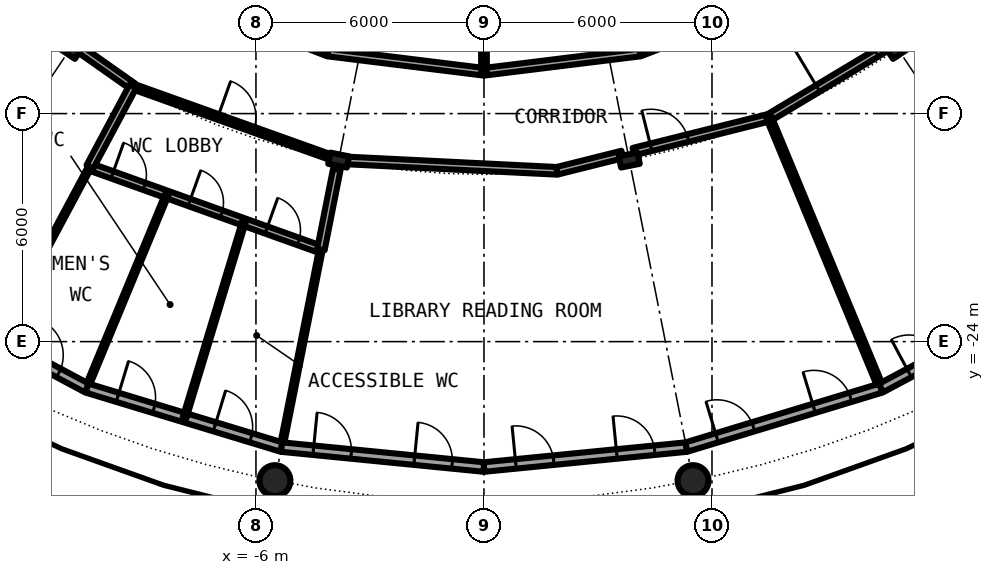
"""IFC4 building model, lengths in metres.
Left out: names, types, materials, properties, quantities, classifications, styles, units other than length and angle.
Written with IfcOpenShell. Run it as: python <this file> out.ifc"""

import sys

from ifc_helpers import new_model, si_unit, direction, frame, frame_2d, origin, origin_2d, place, context, subcontext, project, spatial, rectangle, hollow_circle, i_section, extrude, element, fill, save


model = new_model("IFC4")
c1 = context("Model", 3, precision=1e-05, world=origin(), true_north=direction((0.0, 1.0)))
c2 = subcontext(c1, "Body", "Model", "MODEL_VIEW")
j1 = project(units=[si_unit("LENGTHUNIT", "METRE"), si_unit("PLANEANGLEUNIT", "RADIAN")], contexts=[c1])
p1 = place(None, origin())
s1 = spatial("IfcSite", under=j1, at=p1, CompositionType="ELEMENT")
p2 = place(p1, origin())
s2 = spatial("IfcBuilding", under=s1, at=p2, CompositionType="ELEMENT")
p3 = place(p2, frame((0.0, 0.0, 157.4)))
s3 = spatial("IfcBuildingStorey", under=s2, at=p3, CompositionType="ELEMENT", Elevation=157.4)
for number, where, z_axis, x_axis in (
    (1, (-5.501, -27.658, 0.0), (0.0, 0.0, 1.0), (1.0, 0.0, 0.0)),
    (2, (5.501, -27.658, 0.0), (0.0, 0.0, 1.0), (1.0, 0.0, 0.0)),
):
    element("IfcColumn", number, at=place(p3, frame(where, z_axis=z_axis, x_axis=x_axis)), inside=s3, PredefinedType="COLUMN", context=c2, shape_type="SweptSolid", body=[
        extrude(hollow_circle(Radius=0.406, WallThickness=0.04, at=origin_2d()), origin(), (0.0, 0.0, 1.0), 4.2),
    ])
for number, where, z_axis, x_axis in (
    (3, (-10.889, -16.297, 0.0), (0.0, 0.0, 1.0), (-0.556, -0.831, 0.0)),
    (4, (-3.824, -19.223, 0.0), (0.0, 0.0, 1.0), (-0.195, -0.981, 0.0)),
    (5, (3.824, -19.223, 0.0), (0.0, 0.0, 1.0), (0.195, -0.981, 0.0)),
    (6, (10.889, -16.297, 0.0), (0.0, 0.0, 1.0), (0.556, -0.831, 0.0)),
):
    element("IfcColumn", number, at=place(p3, frame(where, z_axis=z_axis, x_axis=x_axis)), inside=s3, PredefinedType="COLUMN", context=c2, shape_type="SweptSolid", body=[
        extrude(i_section(OverallWidth=0.3, OverallDepth=0.5, WebThickness=0.014, FlangeThickness=0.028, FilletRadius=0.027, at=origin_2d()), origin(), (0.0, 0.0, 1.0), 4.2),
    ])
p4 = place(p3, frame((-15.167, -22.699, 0.0), z_axis=(0.0, 0.0, 1.0), x_axis=(0.881915646801, -0.471407246368, 0.0)))
e7 = element("IfcWall", 7, at=p4, inside=s3, PredefinedType="SOLIDWALL", context=c2, shape_type="SweptSolid", body=[
    extrude(rectangle(XDim=5.352, YDim=0.25, at=frame_2d((2.676, 0.0))), origin(), (0.0, 0.0, 1.0), 3.85),
])
p5 = place(p4, frame((0.841, 0.0, 0.0)))
e8 = element("IfcOpeningElement", 8, at=p5, cuts=e7, PredefinedType="OPENING", context=c2, shape_type="SweptSolid", body=[
    extrude(rectangle(XDim=1.0, YDim=2.2, at=frame_2d((0.5, 1.1))), frame((0.0, 0.135, 0.0), z_axis=(0.0, -1.0, 0.0), x_axis=(1.0, 0.0, 0.0)), (0.0, 0.0, 1.0), 0.27),
])
p6 = place(p4, frame((3.51, 0.0, 0.0)))
e9 = element("IfcOpeningElement", 9, at=p6, cuts=e7, PredefinedType="OPENING", context=c2, shape_type="SweptSolid", body=[
    extrude(rectangle(XDim=1.0, YDim=2.2, at=frame_2d((0.5, 1.1))), frame((0.0, 0.135, 0.0), z_axis=(0.0, -1.0, 0.0), x_axis=(1.0, 0.0, 0.0)), (0.0, 0.0, 1.0), 0.27),
])
p7 = place(p3, frame((-10.447, -25.222, 0.0), z_axis=(0.0, 0.0, 1.0), x_axis=(0.956965678721, -0.290201119486, 0.0)))
e10 = element("IfcWall", 10, at=p7, inside=s3, PredefinedType="SOLIDWALL", context=c2, shape_type="SweptSolid", body=[
    extrude(rectangle(XDim=5.351, YDim=0.25, at=frame_2d((2.676, 0.0))), origin(), (0.0, 0.0, 1.0), 3.85),
])
p8 = place(p7, frame((0.841, 0.0, 0.0)))
e11 = element("IfcOpeningElement", 11, at=p8, cuts=e10, PredefinedType="OPENING", context=c2, shape_type="SweptSolid", body=[
    extrude(rectangle(XDim=1.0, YDim=2.2, at=frame_2d((0.5, 1.1))), frame((0.0, 0.135, 0.0), z_axis=(0.0, -1.0, 0.0), x_axis=(1.0, 0.0, 0.0)), (0.0, 0.0, 1.0), 0.27),
])
p9 = place(p7, frame((3.51, 0.0, 0.0)))
e12 = element("IfcOpeningElement", 12, at=p9, cuts=e10, PredefinedType="OPENING", context=c2, shape_type="SweptSolid", body=[
    extrude(rectangle(XDim=1.0, YDim=2.2, at=frame_2d((0.5, 1.1))), frame((0.0, 0.135, 0.0), z_axis=(0.0, -1.0, 0.0), x_axis=(1.0, 0.0, 0.0)), (0.0, 0.0, 1.0), 0.27),
])
p10 = place(p3, frame((-5.326, -26.775, 0.0), z_axis=(0.0, 0.0, 1.0), x_axis=(0.995173996315, -0.098126026407, 0.0)))
e13 = element("IfcWall", 13, at=p10, inside=s3, PredefinedType="SOLIDWALL", context=c2, shape_type="SweptSolid", body=[
    extrude(rectangle(XDim=5.352, YDim=0.25, at=frame_2d((2.676, 0.0))), origin(), (0.0, 0.0, 1.0), 3.85),
])
p11 = place(p10, frame((0.841, 0.0, 0.0)))
e14 = element("IfcOpeningElement", 14, at=p11, cuts=e13, PredefinedType="OPENING", context=c2, shape_type="SweptSolid", body=[
    extrude(rectangle(XDim=1.0, YDim=2.2, at=frame_2d((0.5, 1.1))), frame((0.0, 0.135, 0.0), z_axis=(0.0, -1.0, 0.0), x_axis=(1.0, 0.0, 0.0)), (0.0, 0.0, 1.0), 0.27),
])
p12 = place(p10, frame((3.51, 0.0, 0.0)))
e15 = element("IfcOpeningElement", 15, at=p12, cuts=e13, PredefinedType="OPENING", context=c2, shape_type="SweptSolid", body=[
    extrude(rectangle(XDim=1.0, YDim=2.2, at=frame_2d((0.5, 1.1))), frame((0.0, 0.135, 0.0), z_axis=(0.0, -1.0, 0.0), x_axis=(1.0, 0.0, 0.0)), (0.0, 0.0, 1.0), 0.27),
])
p13 = place(p3, frame((0.0, -27.3, 0.0), z_axis=(0.0, 0.0, 1.0), x_axis=(0.995173996315, 0.098126026407, 0.0)))
e16 = element("IfcWall", 16, at=p13, inside=s3, PredefinedType="SOLIDWALL", context=c2, shape_type="SweptSolid", body=[
    extrude(rectangle(XDim=5.352, YDim=0.25, at=frame_2d((2.676, 0.0))), origin(), (0.0, 0.0, 1.0), 3.85),
])
p14 = place(p13, frame((0.841, 0.0, 0.0)))
e17 = element("IfcOpeningElement", 17, at=p14, cuts=e16, PredefinedType="OPENING", context=c2, shape_type="SweptSolid", body=[
    extrude(rectangle(XDim=1.0, YDim=2.2, at=frame_2d((0.5, 1.1))), frame((0.0, 0.135, 0.0), z_axis=(0.0, -1.0, 0.0), x_axis=(1.0, 0.0, 0.0)), (0.0, 0.0, 1.0), 0.27),
])
p15 = place(p13, frame((3.51, 0.0, 0.0)))
e18 = element("IfcOpeningElement", 18, at=p15, cuts=e16, PredefinedType="OPENING", context=c2, shape_type="SweptSolid", body=[
    extrude(rectangle(XDim=1.0, YDim=2.2, at=frame_2d((0.5, 1.1))), frame((0.0, 0.135, 0.0), z_axis=(0.0, -1.0, 0.0), x_axis=(1.0, 0.0, 0.0)), (0.0, 0.0, 1.0), 0.27),
])
p16 = place(p3, frame((5.326, -26.775, 0.0), z_axis=(0.0, 0.0, 1.0), x_axis=(0.956965678721, 0.290201119486, 0.0)))
e19 = element("IfcWall", 19, at=p16, inside=s3, PredefinedType="SOLIDWALL", context=c2, shape_type="SweptSolid", body=[
    extrude(rectangle(XDim=5.351, YDim=0.25, at=frame_2d((2.676, 0.0))), origin(), (0.0, 0.0, 1.0), 3.85),
])
p17 = place(p16, frame((0.841, 0.0, 0.0)))
e20 = element("IfcOpeningElement", 20, at=p17, cuts=e19, PredefinedType="OPENING", context=c2, shape_type="SweptSolid", body=[
    extrude(rectangle(XDim=1.0, YDim=2.2, at=frame_2d((0.5, 1.1))), frame((0.0, 0.135, 0.0), z_axis=(0.0, -1.0, 0.0), x_axis=(1.0, 0.0, 0.0)), (0.0, 0.0, 1.0), 0.27),
])
p18 = place(p16, frame((3.51, 0.0, 0.0)))
e21 = element("IfcOpeningElement", 21, at=p18, cuts=e19, PredefinedType="OPENING", context=c2, shape_type="SweptSolid", body=[
    extrude(rectangle(XDim=1.0, YDim=2.2, at=frame_2d((0.5, 1.1))), frame((0.0, 0.135, 0.0), z_axis=(0.0, -1.0, 0.0), x_axis=(1.0, 0.0, 0.0)), (0.0, 0.0, 1.0), 0.27),
])
p19 = place(p3, frame((10.447, -25.222, 0.0), z_axis=(0.0, 0.0, 1.0), x_axis=(0.881915646801, 0.471407246368, 0.0)))
e22 = element("IfcWall", 22, at=p19, inside=s3, PredefinedType="SOLIDWALL", context=c2, shape_type="SweptSolid", body=[
    extrude(rectangle(XDim=5.352, YDim=0.25, at=frame_2d((2.676, 0.0))), origin(), (0.0, 0.0, 1.0), 3.85),
])
p20 = place(p19, frame((0.841, 0.0, 0.0)))
e23 = element("IfcOpeningElement", 23, at=p20, cuts=e22, PredefinedType="OPENING", context=c2, shape_type="SweptSolid", body=[
    extrude(rectangle(XDim=1.0, YDim=2.2, at=frame_2d((0.5, 1.1))), frame((0.0, 0.135, 0.0), z_axis=(0.0, -1.0, 0.0), x_axis=(1.0, 0.0, 0.0)), (0.0, 0.0, 1.0), 0.27),
])
p21 = place(p19, frame((3.51, 0.0, 0.0)))
e24 = element("IfcOpeningElement", 24, at=p21, cuts=e22, PredefinedType="OPENING", context=c2, shape_type="SweptSolid", body=[
    extrude(rectangle(XDim=1.0, YDim=2.2, at=frame_2d((0.5, 1.1))), frame((0.0, 0.135, 0.0), z_axis=(0.0, -1.0, 0.0), x_axis=(1.0, 0.0, 0.0)), (0.0, 0.0, 1.0), 0.27),
])
p22 = place(p3, frame((-10.373, -19.401, 0.0), z_axis=(0.0, 0.0, 1.0), x_axis=(0.941534771306, -0.336915826909, 0.0)))
e25 = element("IfcWall", 25, at=p22, inside=s3, PredefinedType="PARTITIONING", context=c2, shape_type="SweptSolid", body=[
    extrude(rectangle(XDim=6.459, YDim=0.2, at=frame_2d((3.229, 0.0))), origin(), (0.0, 0.0, 1.0), 3.85),
])
p23 = place(p22, frame((0.627, 0.0, 0.0)))
e26 = element("IfcOpeningElement", 26, at=p23, cuts=e25, PredefinedType="OPENING", context=c2, shape_type="SweptSolid", body=[
    extrude(rectangle(XDim=0.9, YDim=2.3, at=frame_2d((0.45, 1.15))), frame((0.0, 0.11, 0.0), z_axis=(0.0, -1.0, 0.0), x_axis=(1.0, 0.0, 0.0)), (0.0, 0.0, 1.0), 0.22),
])
p24 = place(p22, frame((2.781, 0.0, 0.0)))
e27 = element("IfcOpeningElement", 27, at=p24, cuts=e25, PredefinedType="OPENING", context=c2, shape_type="SweptSolid", body=[
    extrude(rectangle(XDim=0.9, YDim=2.3, at=frame_2d((0.45, 1.15))), frame((0.0, 0.11, 0.0), z_axis=(0.0, -1.0, 0.0), x_axis=(1.0, 0.0, 0.0)), (0.0, 0.0, 1.0), 0.22),
])
p25 = place(p22, frame((4.933, 0.0, 0.0)))
e28 = element("IfcOpeningElement", 28, at=p25, cuts=e25, PredefinedType="OPENING", context=c2, shape_type="SweptSolid", body=[
    extrude(rectangle(XDim=0.9, YDim=2.3, at=frame_2d((0.45, 1.15))), frame((0.0, 0.11, 0.0), z_axis=(0.0, -1.0, 0.0), x_axis=(1.0, 0.0, 0.0)), (0.0, 0.0, 1.0), 0.22),
])
p26 = place(p3, frame((-10.688, -16.266, 0.0), z_axis=(0.0, 0.0, 1.0), x_axis=(0.817772792535, -0.575541188613, 0.0)))
e29 = element("IfcWall", 29, at=p26, inside=s3, PredefinedType="PARTITIONING", context=c2, shape_type="SweptSolid", body=[
    extrude(rectangle(XDim=1.772, YDim=0.2, at=frame_2d((0.886, 0.0))), origin(), (0.0, 0.0, 1.0), 3.54),
])
p27 = place(p3, frame((-9.239, -17.286, 0.0), z_axis=(0.0, 0.0, 1.0), x_axis=(0.941550382061, -0.336872198379, 0.0)))
e30 = element("IfcWall", 30, at=p27, inside=s3, PredefinedType="PARTITIONING", context=c2, shape_type="SweptSolid", body=[
    extrude(rectangle(XDim=5.599, YDim=0.15, at=frame_2d((2.8, 0.0))), origin(), (0.0, 0.0, 1.0), 3.54),
])
p28 = place(p27, frame((2.376, 0.0, 0.0)))
e31 = element("IfcOpeningElement", 31, at=p28, cuts=e30, PredefinedType="OPENING", context=c2, shape_type="SweptSolid", body=[
    extrude(rectangle(XDim=1.0, YDim=2.3, at=frame_2d((0.5, 1.15))), frame((0.0, 0.085, 0.0), z_axis=(0.0, -1.0, 0.0), x_axis=(1.0, 0.0, 0.0)), (0.0, 0.0, 1.0), 0.17),
])
p29 = place(p3, frame((-3.672, -19.23, 0.0), z_axis=(0.0, 0.0, 1.0), x_axis=(0.998783562084, -0.049309188909, 0.0)))
e32 = element("IfcWall", 32, at=p29, inside=s3, PredefinedType="PARTITIONING", context=c2, shape_type="SweptSolid", body=[
    extrude(rectangle(XDim=5.6, YDim=0.2, at=frame_2d((2.8, 0.0))), origin(), (0.0, 0.0, 1.0), 3.54),
])
p30 = place(p3, frame((1.921, -19.506, 0.0), z_axis=(0.0, 0.0, 1.0), x_axis=(0.969996560647, 0.243118638391, 0.0)))
e33 = element("IfcWall", 33, at=p30, inside=s3, PredefinedType="PARTITIONING", context=c2, shape_type="SweptSolid", body=[
    extrude(rectangle(XDim=1.773, YDim=0.2, at=frame_2d((0.887, 0.0))), origin(), (0.0, 0.0, 1.0), 3.54),
])
p31 = place(p3, frame((3.933, -19.002, 0.0), z_axis=(0.0, 0.0, 1.0), x_axis=(0.970009604092, 0.243066591637, 0.0)))
e34 = element("IfcWall", 34, at=p31, inside=s3, PredefinedType="PARTITIONING", context=c2, shape_type="SweptSolid", body=[
    extrude(rectangle(XDim=3.678, YDim=0.2, at=frame_2d((1.839, 0.0))), origin(), (0.0, 0.0, 1.0), 3.54),
])
p32 = place(p31, frame((0.476, 0.0, 0.0)))
e35 = element("IfcOpeningElement", 35, at=p32, cuts=e34, PredefinedType="OPENING", context=c2, shape_type="SweptSolid", body=[
    extrude(rectangle(XDim=1.0, YDim=2.3, at=frame_2d((0.5, 1.15))), frame((0.0, 0.11, 0.0), z_axis=(0.0, -1.0, 0.0), x_axis=(1.0, 0.0, 0.0)), (0.0, 0.0, 1.0), 0.22),
])
p33 = place(p3, frame((7.501, -18.108, 0.0), z_axis=(0.0, 0.0, 1.0), x_axis=(0.857750505244, 0.514066212421, 0.0)))
e36 = element("IfcWall", 36, at=p33, inside=s3, PredefinedType="PARTITIONING", context=c2, shape_type="SweptSolid", body=[
    extrude(rectangle(XDim=3.678, YDim=0.2, at=frame_2d((1.839, 0.0))), origin(), (0.0, 0.0, 1.0), 3.54),
])
p34 = place(p33, frame((1.5, 0.0, 0.0)))
e37 = element("IfcOpeningElement", 37, at=p34, cuts=e36, PredefinedType="OPENING", context=c2, shape_type="SweptSolid", body=[
    extrude(rectangle(XDim=1.8, YDim=2.3, at=frame_2d((0.9, 1.15))), frame((0.0, 0.11, 0.0), z_axis=(0.0, -1.0, 0.0), x_axis=(1.0, 0.0, 0.0)), (0.0, 0.0, 1.0), 0.22),
])
p35 = place(p3, frame((-7.967, -14.904, 0.0), z_axis=(0.0, 0.0, 1.0), x_axis=(0.932943640288, -0.360022449363, 0.0)))
e38 = element("IfcWall", 38, at=p35, inside=s3, PredefinedType="PARTITIONING", context=c2, shape_type="SweptSolid", body=[
    extrude(rectangle(XDim=4.139, YDim=0.2, at=frame_2d((2.069, 0.0))), origin(), (0.0, 0.0, 1.0), 3.85),
])
p36 = place(p35, frame((1.569, 0.0, 0.0)))
e39 = element("IfcOpeningElement", 39, at=p36, cuts=e38, PredefinedType="OPENING", context=c2, shape_type="SweptSolid", body=[
    extrude(rectangle(XDim=1.0, YDim=2.3, at=frame_2d((0.5, 1.15))), frame((0.0, 0.11, 0.0), z_axis=(0.0, -1.0, 0.0), x_axis=(1.0, 0.0, 0.0)), (0.0, 0.0, 1.0), 0.22),
])
for number, where, z_axis, x_axis in (
    (40, (-4.106, -16.394, 0.0), (0.0, 0.0, 1.0), (0.992, -0.122, 0.0)),
    (41, (0.0, -16.9, 0.0), (0.0, 0.0, 1.0), (0.992, 0.122, 0.0)),
):
    element("IfcWall", number, at=place(p3, frame(where, z_axis=z_axis, x_axis=x_axis)), inside=s3, PredefinedType="PARTITIONING", context=c2, shape_type="SweptSolid", body=[
        extrude(rectangle(XDim=4.137, YDim=0.2, at=frame_2d((2.068, 0.0))), origin(), (0.0, 0.0, 1.0), 3.85),
    ])
p37 = place(p3, frame((4.106, -16.394, 0.0), z_axis=(0.0, 0.0, 1.0), x_axis=(0.932943640288, 0.360022449363, 0.0)))
e42 = element("IfcWall", 42, at=p37, inside=s3, PredefinedType="PARTITIONING", context=c2, shape_type="SweptSolid", body=[
    extrude(rectangle(XDim=4.139, YDim=0.2, at=frame_2d((2.069, 0.0))), origin(), (0.0, 0.0, 1.0), 3.85),
])
p38 = place(p37, frame((1.569, 0.0, 0.0)))
e43 = element("IfcOpeningElement", 43, at=p38, cuts=e42, PredefinedType="OPENING", context=c2, shape_type="SweptSolid", body=[
    extrude(rectangle(XDim=1.0, YDim=2.3, at=frame_2d((0.5, 1.15))), frame((0.0, 0.11, 0.0), z_axis=(0.0, -1.0, 0.0), x_axis=(1.0, 0.0, 0.0)), (0.0, 0.0, 1.0), 0.22),
])
p39 = place(p3, frame((-12.81, -23.966, 0.0), z_axis=(0.0, 0.0, 1.0), x_axis=(0.471464572183, 0.88188500224, 0.0)))
e44 = element("IfcWall", 44, at=p39, inside=s3, PredefinedType="PARTITIONING", context=c2, shape_type="SweptSolid", body=[
    extrude(rectangle(XDim=5.175, YDim=0.1, at=frame_2d((2.588, 0.0))), origin(), (0.0, 0.0, 1.0), 3.85),
])
p40 = place(p3, frame((-10.407, -25.103, 0.0), z_axis=(0.0, 0.0, 1.0), x_axis=(0.382973519041, 0.923759321313, 0.0)))
e45 = element("IfcWall", 45, at=p40, inside=s3, PredefinedType="PARTITIONING", context=c2, shape_type="SweptSolid", body=[
    extrude(rectangle(XDim=5.387, YDim=0.1, at=frame_2d((2.693, 0.0))), origin(), (0.0, 0.0, 1.0), 3.85),
])
p41 = place(p3, frame((-10.37, -19.402, 0.0), z_axis=(0.0, 0.0, 1.0), x_axis=(0.471385457832, 0.881927293004, 0.0)))
e46 = element("IfcWall", 46, at=p41, inside=s3, PredefinedType="PARTITIONING", context=c2, shape_type="SweptSolid", body=[
    extrude(rectangle(XDim=2.399, YDim=0.2, at=frame_2d((1.2, 0.0))), origin(), (0.0, 0.0, 1.0), 3.85),
])
p42 = place(p3, frame((-7.88, -26.007, 0.0), z_axis=(0.0, 0.0, 1.0), x_axis=(0.289945753839, 0.957043081492, 0.0)))
e47 = element("IfcWall", 47, at=p42, inside=s3, PredefinedType="PARTITIONING", context=c2, shape_type="SweptSolid", body=[
    extrude(rectangle(XDim=5.386, YDim=0.1, at=frame_2d((2.693, 0.0))), origin(), (0.0, 0.0, 1.0), 3.85),
])
p43 = place(p3, frame((-5.301, -26.653, 0.0), z_axis=(0.0, 0.0, 1.0), x_axis=(0.194963902417, 0.980810418355, 0.0)))
e48 = element("IfcWall", 48, at=p43, inside=s3, PredefinedType="PARTITIONING", context=c2, shape_type="SweptSolid", body=[
    extrude(rectangle(XDim=5.176, YDim=0.1, at=frame_2d((2.588, 0.0))), origin(), (0.0, 0.0, 1.0), 3.85),
])
p44 = place(p3, frame((-4.292, -21.577, 0.0), z_axis=(0.0, 0.0, 1.0), x_axis=(0.194936308723, 0.980815902981, 0.0)))
e49 = element("IfcWall", 49, at=p44, inside=s3, PredefinedType="PARTITIONING", context=c2, shape_type="SweptSolid", body=[
    extrude(rectangle(XDim=2.149, YDim=0.2, at=frame_2d((1.075, 0.0))), origin(), (0.0, 0.0, 1.0), 3.85),
])
p45 = place(p3, frame((0.0, -16.9, 0.0), z_axis=(0.0, 0.0, 1.0), x_axis=(0.0, 1.0, 0.0)))
e50 = element("IfcWall", 50, at=p45, inside=s3, PredefinedType="PARTITIONING", context=c2, shape_type="SweptSolid", body=[
    extrude(rectangle(XDim=9.18, YDim=0.15, at=frame_2d((4.59, 0.0))), origin(), (0.0, 0.0, 1.0), 3.85),
])
p46 = place(p3, frame((7.501, -18.108, 0.0), z_axis=(0.0, 0.0, 1.0), x_axis=(0.382600411313, -0.923913916587, 0.0)))
e51 = element("IfcWall", 51, at=p46, inside=s3, PredefinedType="PARTITIONING", context=c2, shape_type="SweptSolid", body=[
    extrude(rectangle(XDim=7.574, YDim=0.15, at=frame_2d((3.787, 0.0))), origin(), (0.0, 0.0, 1.0), 3.85),
])
p47 = place(p6, origin())
e52 = element("IfcDoor", 52, at=p47, inside=s3, OperationType="SINGLE_SWING_LEFT", PredefinedType="DOOR", context=c2, shape_type="SweptSolid", body=[
    extrude(rectangle(XDim=1.0, YDim=2.2, at=frame_2d((0.5, 1.1))), frame((0.0, 0.025, 0.0), z_axis=(0.0, -1.0, 0.0), x_axis=(1.0, 0.0, 0.0)), (0.0, 0.0, 1.0), 0.05),
])
fill(e9, e52)
p48 = place(p8, origin())
e53 = element("IfcDoor", 53, at=p48, inside=s3, OperationType="SINGLE_SWING_LEFT", PredefinedType="DOOR", context=c2, shape_type="SweptSolid", body=[
    extrude(rectangle(XDim=1.0, YDim=2.2, at=frame_2d((0.5, 1.1))), frame((0.0, 0.025, 0.0), z_axis=(0.0, -1.0, 0.0), x_axis=(1.0, 0.0, 0.0)), (0.0, 0.0, 1.0), 0.05),
])
fill(e11, e53)
p49 = place(p9, origin())
e54 = element("IfcDoor", 54, at=p49, inside=s3, OperationType="SINGLE_SWING_LEFT", PredefinedType="DOOR", context=c2, shape_type="SweptSolid", body=[
    extrude(rectangle(XDim=1.0, YDim=2.2, at=frame_2d((0.5, 1.1))), frame((0.0, 0.025, 0.0), z_axis=(0.0, -1.0, 0.0), x_axis=(1.0, 0.0, 0.0)), (0.0, 0.0, 1.0), 0.05),
])
fill(e12, e54)
p50 = place(p11, origin())
e55 = element("IfcDoor", 55, at=p50, inside=s3, OperationType="SINGLE_SWING_LEFT", PredefinedType="DOOR", context=c2, shape_type="SweptSolid", body=[
    extrude(rectangle(XDim=1.0, YDim=2.2, at=frame_2d((0.5, 1.1))), frame((0.0, 0.025, 0.0), z_axis=(0.0, -1.0, 0.0), x_axis=(1.0, 0.0, 0.0)), (0.0, 0.0, 1.0), 0.05),
])
fill(e14, e55)
p51 = place(p12, origin())
e56 = element("IfcDoor", 56, at=p51, inside=s3, OperationType="SINGLE_SWING_LEFT", PredefinedType="DOOR", context=c2, shape_type="SweptSolid", body=[
    extrude(rectangle(XDim=1.0, YDim=2.2, at=frame_2d((0.5, 1.1))), frame((0.0, 0.025, 0.0), z_axis=(0.0, -1.0, 0.0), x_axis=(1.0, 0.0, 0.0)), (0.0, 0.0, 1.0), 0.05),
])
fill(e15, e56)
p52 = place(p14, origin())
e57 = element("IfcDoor", 57, at=p52, inside=s3, OperationType="SINGLE_SWING_LEFT", PredefinedType="DOOR", context=c2, shape_type="SweptSolid", body=[
    extrude(rectangle(XDim=1.0, YDim=2.2, at=frame_2d((0.5, 1.1))), frame((0.0, 0.025, 0.0), z_axis=(0.0, -1.0, 0.0), x_axis=(1.0, 0.0, 0.0)), (0.0, 0.0, 1.0), 0.05),
])
fill(e17, e57)
p53 = place(p15, origin())
e58 = element("IfcDoor", 58, at=p53, inside=s3, OperationType="SINGLE_SWING_LEFT", PredefinedType="DOOR", context=c2, shape_type="SweptSolid", body=[
    extrude(rectangle(XDim=1.0, YDim=2.2, at=frame_2d((0.5, 1.1))), frame((0.0, 0.025, 0.0), z_axis=(0.0, -1.0, 0.0), x_axis=(1.0, 0.0, 0.0)), (0.0, 0.0, 1.0), 0.05),
])
fill(e18, e58)
p54 = place(p17, origin())
e59 = element("IfcDoor", 59, at=p54, inside=s3, OperationType="SINGLE_SWING_LEFT", PredefinedType="DOOR", context=c2, shape_type="SweptSolid", body=[
    extrude(rectangle(XDim=1.0, YDim=2.2, at=frame_2d((0.5, 1.1))), frame((0.0, 0.025, 0.0), z_axis=(0.0, -1.0, 0.0), x_axis=(1.0, 0.0, 0.0)), (0.0, 0.0, 1.0), 0.05),
])
fill(e20, e59)
p55 = place(p18, origin())
e60 = element("IfcDoor", 60, at=p55, inside=s3, OperationType="SINGLE_SWING_LEFT", PredefinedType="DOOR", context=c2, shape_type="SweptSolid", body=[
    extrude(rectangle(XDim=1.0, YDim=2.2, at=frame_2d((0.5, 1.1))), frame((0.0, 0.025, 0.0), z_axis=(0.0, -1.0, 0.0), x_axis=(1.0, 0.0, 0.0)), (0.0, 0.0, 1.0), 0.05),
])
fill(e21, e60)
p56 = place(p20, origin())
e61 = element("IfcDoor", 61, at=p56, inside=s3, OperationType="SINGLE_SWING_LEFT", PredefinedType="DOOR", context=c2, shape_type="SweptSolid", body=[
    extrude(rectangle(XDim=1.0, YDim=2.2, at=frame_2d((0.5, 1.1))), frame((0.0, 0.025, 0.0), z_axis=(0.0, -1.0, 0.0), x_axis=(1.0, 0.0, 0.0)), (0.0, 0.0, 1.0), 0.05),
])
fill(e23, e61)
p57 = place(p28, origin())
e62 = element("IfcDoor", 62, at=p57, inside=s3, OperationType="SINGLE_SWING_RIGHT", PredefinedType="DOOR", context=c2, shape_type="SweptSolid", body=[
    extrude(rectangle(XDim=1.0, YDim=2.3, at=frame_2d((0.5, 1.15))), frame((0.0, 0.025, 0.0), z_axis=(0.0, -1.0, 0.0), x_axis=(1.0, 0.0, 0.0)), (0.0, 0.0, 1.0), 0.05),
])
fill(e31, e62)
p58 = place(p23, origin())
e63 = element("IfcDoor", 63, at=p58, inside=s3, OperationType="SINGLE_SWING_LEFT", PredefinedType="DOOR", context=c2, shape_type="SweptSolid", body=[
    extrude(rectangle(XDim=0.9, YDim=2.3, at=frame_2d((0.45, 1.15))), frame((0.0, 0.025, 0.0), z_axis=(0.0, -1.0, 0.0), x_axis=(1.0, 0.0, 0.0)), (0.0, 0.0, 1.0), 0.05),
])
fill(e26, e63)
p59 = place(p24, origin())
e64 = element("IfcDoor", 64, at=p59, inside=s3, OperationType="SINGLE_SWING_RIGHT", PredefinedType="DOOR", context=c2, shape_type="SweptSolid", body=[
    extrude(rectangle(XDim=0.9, YDim=2.3, at=frame_2d((0.45, 1.15))), frame((0.0, 0.025, 0.0), z_axis=(0.0, -1.0, 0.0), x_axis=(1.0, 0.0, 0.0)), (0.0, 0.0, 1.0), 0.05),
])
fill(e27, e64)
p60 = place(p25, origin())
e65 = element("IfcDoor", 65, at=p60, inside=s3, OperationType="SINGLE_SWING_RIGHT", PredefinedType="DOOR", context=c2, shape_type="SweptSolid", body=[
    extrude(rectangle(XDim=0.9, YDim=2.3, at=frame_2d((0.45, 1.15))), frame((0.0, 0.025, 0.0), z_axis=(0.0, -1.0, 0.0), x_axis=(1.0, 0.0, 0.0)), (0.0, 0.0, 1.0), 0.05),
])
fill(e28, e65)
p61 = place(p32, origin())
e66 = element("IfcDoor", 66, at=p61, inside=s3, OperationType="SINGLE_SWING_LEFT", PredefinedType="DOOR", context=c2, shape_type="SweptSolid", body=[
    extrude(rectangle(XDim=1.0, YDim=2.3, at=frame_2d((0.5, 1.15))), frame((0.0, 0.025, 0.0), z_axis=(0.0, -1.0, 0.0), x_axis=(1.0, 0.0, 0.0)), (0.0, 0.0, 1.0), 0.05),
])
fill(e35, e66)
p62 = place(p34, origin())
e67 = element("IfcDoor", 67, at=p62, inside=s3, OperationType="DOUBLE_DOOR_SINGLE_SWING", PredefinedType="DOOR", context=c2, shape_type="SweptSolid", body=[
    extrude(rectangle(XDim=1.8, YDim=2.3, at=frame_2d((0.9, 1.15))), frame((0.0, 0.025, 0.0), z_axis=(0.0, -1.0, 0.0), x_axis=(1.0, 0.0, 0.0)), (0.0, 0.0, 1.0), 0.05),
])
fill(e37, e67)
save(model, sys.argv[1])
